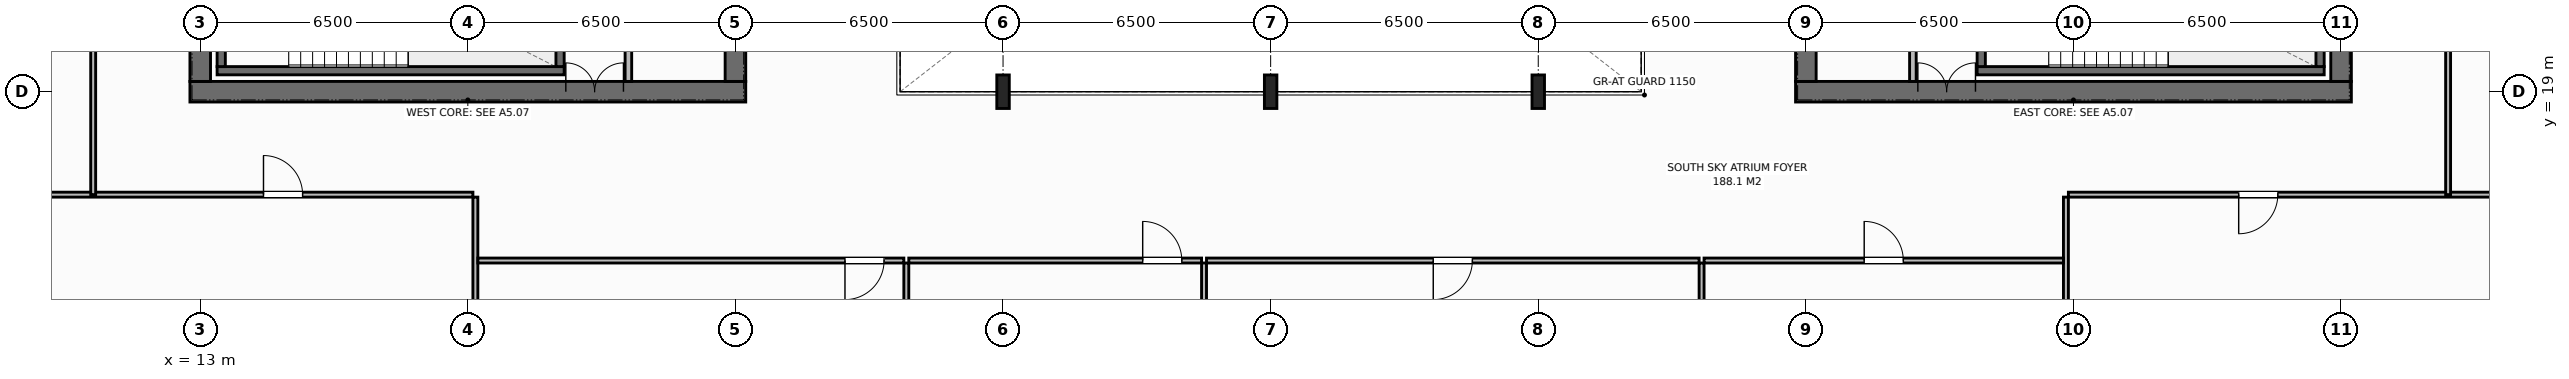
"""IFC4 building model, lengths in metres.
Left out: names, types, materials, properties, quantities, classifications, styles, units other than length and angle.
Written with IfcOpenShell. Run it as: python <this file> out.ifc"""

import sys

from ifc_helpers import new_model, si_unit, direction, frame, frame_2d, origin, origin_2d, place, context, subcontext, project, spatial, rectangle, i_section, extrude, element, fill, save


model = new_model("IFC4")
c1 = context("Model", 3, precision=1e-05, world=origin(), true_north=direction((0.0, 1.0)))
c2 = subcontext(c1, "Body", "Model", "MODEL_VIEW")
j1 = project(units=[si_unit("LENGTHUNIT", "METRE"), si_unit("PLANEANGLEUNIT", "RADIAN")], contexts=[c1])
p1 = place(None, origin())
s1 = spatial("IfcSite", under=j1, at=p1, CompositionType="ELEMENT")
p2 = place(p1, origin())
s2 = spatial("IfcBuilding", under=s1, at=p2, CompositionType="ELEMENT")
p3 = place(p2, frame((0.0, 0.0, 202.4)))
s3 = spatial("IfcBuildingStorey", under=s2, at=p3, CompositionType="ELEMENT", Elevation=202.4)
p4 = place(p3, frame((12.75, 19.0, 0.0), z_axis=(0.0, 0.0, 1.0), x_axis=(1.0, 0.0, 0.0)))
e1 = element("IfcWall", 1, at=p4, inside=s3, PredefinedType="SHEAR", context=c2, shape_type="SweptSolid", body=[
    extrude(rectangle(XDim=13.5, YDim=0.5, at=frame_2d((6.75, 0.0))), origin(), (0.0, 0.0, 1.0), 3.8),
])
p5 = place(p4, frame((9.13, 0.0, 0.0)))
e2 = element("IfcOpeningElement", 2, at=p5, cuts=e1, PredefinedType="OPENING", context=c2, shape_type="SweptSolid", body=[
    extrude(rectangle(XDim=1.4, YDim=2.2, at=frame_2d((0.7, 1.1))), frame((0.0, 0.26, 0.0), z_axis=(0.0, -1.0, 0.0), x_axis=(1.0, 0.0, 0.0)), (0.0, 0.0, 1.0), 0.52),
])
p6 = place(p3, frame((13.0, 19.25, 0.0), z_axis=(0.0, 0.0, 1.0), x_axis=(0.0, 1.0, 0.0)))
e3 = element("IfcWall", 3, at=p6, inside=s3, PredefinedType="SHEAR", context=c2, shape_type="SweptSolid", body=[
    extrude(rectangle(XDim=13.5, YDim=0.5, at=frame_2d((6.75, 0.0))), origin(), (0.0, 0.0, 1.0), 3.8),
])
p7 = place(p6, frame((4.8, 0.0, 0.0)))
e4 = element("IfcOpeningElement", 4, at=p7, cuts=e3, PredefinedType="OPENING", context=c2, shape_type="SweptSolid", body=[
    extrude(rectangle(XDim=1.4, YDim=2.2, at=frame_2d((0.7, 1.1))), frame((0.0, 0.26, 0.0), z_axis=(0.0, -1.0, 0.0), x_axis=(1.0, 0.0, 0.0)), (0.0, 0.0, 1.0), 0.52),
])
p8 = place(p3, frame((26.0, 19.25, 0.0), z_axis=(0.0, 0.0, 1.0), x_axis=(0.0, 1.0, 0.0)))
e5 = element("IfcWall", 5, at=p8, inside=s3, PredefinedType="SHEAR", context=c2, shape_type="SweptSolid", body=[
    extrude(rectangle(XDim=13.5, YDim=0.5, at=frame_2d((6.75, 0.0))), origin(), (0.0, 0.0, 1.0), 3.8),
])
p9 = place(p3, frame((51.75, 19.0, 0.0), z_axis=(0.0, 0.0, 1.0), x_axis=(1.0, 0.0, 0.0)))
e6 = element("IfcWall", 6, at=p9, inside=s3, PredefinedType="SHEAR", context=c2, shape_type="SweptSolid", body=[
    extrude(rectangle(XDim=13.5, YDim=0.5, at=frame_2d((6.75, 0.0))), origin(), (0.0, 0.0, 1.0), 3.8),
])
p10 = place(p9, frame((2.97, 0.0, 0.0)))
e7 = element("IfcOpeningElement", 7, at=p10, cuts=e6, PredefinedType="OPENING", context=c2, shape_type="SweptSolid", body=[
    extrude(rectangle(XDim=1.4, YDim=2.2, at=frame_2d((0.7, 1.1))), frame((0.0, 0.26, 0.0), z_axis=(0.0, -1.0, 0.0), x_axis=(1.0, 0.0, 0.0)), (0.0, 0.0, 1.0), 0.52),
])
p11 = place(p3, frame((52.0, 19.25, 0.0), z_axis=(0.0, 0.0, 1.0), x_axis=(0.0, 1.0, 0.0)))
e8 = element("IfcWall", 8, at=p11, inside=s3, PredefinedType="SHEAR", context=c2, shape_type="SweptSolid", body=[
    extrude(rectangle(XDim=13.5, YDim=0.5, at=frame_2d((6.75, 0.0))), origin(), (0.0, 0.0, 1.0), 3.8),
])
p12 = place(p3, frame((65.0, 19.25, 0.0), z_axis=(0.0, 0.0, 1.0), x_axis=(0.0, 1.0, 0.0)))
e9 = element("IfcWall", 9, at=p12, inside=s3, PredefinedType="SHEAR", context=c2, shape_type="SweptSolid", body=[
    extrude(rectangle(XDim=13.5, YDim=0.5, at=frame_2d((6.75, 0.0))), origin(), (0.0, 0.0, 1.0), 3.8),
])
p13 = place(p12, frame((8.2, 0.0, 0.0)))
e10 = element("IfcOpeningElement", 10, at=p13, cuts=e9, PredefinedType="OPENING", context=c2, shape_type="SweptSolid", body=[
    extrude(rectangle(XDim=1.3, YDim=2.2, at=frame_2d((0.65, 1.1))), frame((0.0, 0.26, 0.0), z_axis=(0.0, -1.0, 0.0), x_axis=(1.0, 0.0, 0.0)), (0.0, 0.0, 1.0), 0.52),
])
p14 = place(p3, frame((13.41, 19.51, 0.0), z_axis=(0.0, 0.0, 1.0), x_axis=(1.0, 0.0, 0.0)))
e11 = element("IfcWall", 11, at=p14, inside=s3, PredefinedType="SHEAR", context=c2, shape_type="SweptSolid", body=[
    extrude(rectangle(XDim=8.43, YDim=0.2, at=frame_2d((4.215, 0.0))), origin(), (0.0, 0.0, 1.0), 3.8),
])
for number, where, z_axis, x_axis in (
    (12, (13.51, 19.61, 0.0), (0.0, 0.0, 1.0), (0.0, 1.0, 0.0)),
    (13, (21.74, 19.61, 0.0), (0.0, 0.0, 1.0), (0.0, 1.0, 0.0)),
):
    element("IfcWall", number, at=place(p3, frame(where, z_axis=z_axis, x_axis=x_axis)), inside=s3, PredefinedType="SHEAR", context=c2, shape_type="SweptSolid", body=[
        extrude(rectangle(XDim=3.28, YDim=0.2, at=frame_2d((1.64, 0.0))), origin(), (0.0, 0.0, 1.0), 3.8),
    ])
p15 = place(p3, frame((56.16, 19.51, 0.0), z_axis=(0.0, 0.0, 1.0), x_axis=(1.0, 0.0, 0.0)))
e14 = element("IfcWall", 14, at=p15, inside=s3, PredefinedType="SHEAR", context=c2, shape_type="SweptSolid", body=[
    extrude(rectangle(XDim=8.43, YDim=0.2, at=frame_2d((4.215, 0.0))), origin(), (0.0, 0.0, 1.0), 3.8),
])
for number, where, z_axis, x_axis in (
    (15, (56.26, 19.61, 0.0), (0.0, 0.0, 1.0), (0.0, 1.0, 0.0)),
    (16, (64.49, 19.61, 0.0), (0.0, 0.0, 1.0), (0.0, 1.0, 0.0)),
):
    element("IfcWall", number, at=place(p3, frame(where, z_axis=z_axis, x_axis=x_axis)), inside=s3, PredefinedType="SHEAR", context=c2, shape_type="SweptSolid", body=[
        extrude(rectangle(XDim=3.28, YDim=0.2, at=frame_2d((1.64, 0.0))), origin(), (0.0, 0.0, 1.0), 3.8),
    ])
for number, where, z_axis, x_axis in (
    (17, (32.5, 19.0, 0.0), (0.0, 0.0, 1.0), (1.0, 0.0, 0.0)),
    (18, (39.0, 19.0, 0.0), (0.0, 0.0, 1.0), (1.0, 0.0, 0.0)),
    (19, (45.5, 19.0, 0.0), (0.0, 0.0, 1.0), (1.0, 0.0, 0.0)),
):
    element("IfcColumn", number, at=place(p3, frame(where, z_axis=z_axis, x_axis=x_axis)), inside=s3, PredefinedType="COLUMN", context=c2, shape_type="SweptSolid", body=[
        extrude(i_section(OverallWidth=0.303, OverallDepth=0.814, WebThickness=0.021, FlangeThickness=0.04, at=origin_2d()), origin(), (0.0, 0.0, 1.0), 3.8),
    ])
p16 = place(p3, frame((23.4, 19.25, 0.0), z_axis=(0.0, 0.0, 1.0), x_axis=(0.0, 1.0, 0.0)))
e20 = element("IfcWall", 20, at=p16, inside=s3, PredefinedType="STANDARD", context=c2, shape_type="SweptSolid", body=[
    extrude(rectangle(XDim=13.5, YDim=0.16, at=frame_2d((6.75, 0.0))), origin(), (0.0, 0.0, 1.0), 3.58),
])
p17 = place(p16, frame((2.25, 0.0, 0.0)))
e21 = element("IfcOpeningElement", 21, at=p17, cuts=e20, PredefinedType="OPENING", context=c2, shape_type="SweptSolid", body=[
    extrude(rectangle(XDim=0.95, YDim=2.15, at=frame_2d((0.475, 1.075))), frame((0.0, 0.09, 0.0), z_axis=(0.0, -1.0, 0.0), x_axis=(1.0, 0.0, 0.0)), (0.0, 0.0, 1.0), 0.18),
])
p18 = place(p16, frame((6.35, 0.0, 0.0)))
e22 = element("IfcOpeningElement", 22, at=p18, cuts=e20, PredefinedType="OPENING", context=c2, shape_type="SweptSolid", body=[
    extrude(rectangle(XDim=0.95, YDim=2.15, at=frame_2d((0.475, 1.075))), frame((0.0, 0.09, 0.0), z_axis=(0.0, -1.0, 0.0), x_axis=(1.0, 0.0, 0.0)), (0.0, 0.0, 1.0), 0.18),
])
p19 = place(p16, frame((9.35, 0.0, 0.0)))
e23 = element("IfcOpeningElement", 23, at=p19, cuts=e20, PredefinedType="OPENING", context=c2, shape_type="SweptSolid", body=[
    extrude(rectangle(XDim=1.1, YDim=2.2, at=frame_2d((0.55, 1.1))), frame((0.0, 0.09, 0.0), z_axis=(0.0, -1.0, 0.0), x_axis=(1.0, 0.0, 0.0)), (0.0, 0.0, 1.0), 0.18),
])
p20 = place(p16, frame((11.55, 0.0, 0.0)))
e24 = element("IfcOpeningElement", 24, at=p20, cuts=e20, PredefinedType="OPENING", context=c2, shape_type="SweptSolid", body=[
    extrude(rectangle(XDim=1.1, YDim=2.2, at=frame_2d((0.55, 1.1))), frame((0.0, 0.09, 0.0), z_axis=(0.0, -1.0, 0.0), x_axis=(1.0, 0.0, 0.0)), (0.0, 0.0, 1.0), 0.18),
])
p21 = place(p3, frame((54.6, 19.25, 0.0), z_axis=(0.0, 0.0, 1.0), x_axis=(0.0, 1.0, 0.0)))
e25 = element("IfcWall", 25, at=p21, inside=s3, PredefinedType="STANDARD", context=c2, shape_type="SweptSolid", body=[
    extrude(rectangle(XDim=13.5, YDim=0.16, at=frame_2d((6.75, 0.0))), origin(), (0.0, 0.0, 1.0), 3.58),
])
p22 = place(p21, frame((2.15, 0.0, 0.0)))
e26 = element("IfcOpeningElement", 26, at=p22, cuts=e25, PredefinedType="OPENING", context=c2, shape_type="SweptSolid", body=[
    extrude(rectangle(XDim=0.95, YDim=2.15, at=frame_2d((0.475, 1.075))), frame((0.0, 0.09, 0.0), z_axis=(0.0, -1.0, 0.0), x_axis=(1.0, 0.0, 0.0)), (0.0, 0.0, 1.0), 0.18),
])
p23 = place(p21, frame((6.25, 0.0, 0.0)))
e27 = element("IfcOpeningElement", 27, at=p23, cuts=e25, PredefinedType="OPENING", context=c2, shape_type="SweptSolid", body=[
    extrude(rectangle(XDim=0.95, YDim=2.15, at=frame_2d((0.475, 1.075))), frame((0.0, 0.09, 0.0), z_axis=(0.0, -1.0, 0.0), x_axis=(1.0, 0.0, 0.0)), (0.0, 0.0, 1.0), 0.18),
])
p24 = place(p21, frame((9.35, 0.0, 0.0)))
e28 = element("IfcOpeningElement", 28, at=p24, cuts=e25, PredefinedType="OPENING", context=c2, shape_type="SweptSolid", body=[
    extrude(rectangle(XDim=1.1, YDim=2.2, at=frame_2d((0.55, 1.1))), frame((0.0, 0.09, 0.0), z_axis=(0.0, -1.0, 0.0), x_axis=(1.0, 0.0, 0.0)), (0.0, 0.0, 1.0), 0.18),
])
p25 = place(p21, frame((11.55, 0.0, 0.0)))
e29 = element("IfcOpeningElement", 29, at=p25, cuts=e25, PredefinedType="OPENING", context=c2, shape_type="SweptSolid", body=[
    extrude(rectangle(XDim=1.1, YDim=2.2, at=frame_2d((0.55, 1.1))), frame((0.0, 0.09, 0.0), z_axis=(0.0, -1.0, 0.0), x_axis=(1.0, 0.0, 0.0)), (0.0, 0.0, 1.0), 0.18),
])
p26 = place(p3, frame((19.683, 5.02, 0.0), z_axis=(0.0, 0.0, 1.0), x_axis=(0.0, 1.0, 0.0)))
e30 = element("IfcWall", 30, at=p26, inside=s3, PredefinedType="PARTITIONING", context=c2, shape_type="SweptSolid", body=[
    extrude(rectangle(XDim=11.42, YDim=0.12, at=frame_2d((5.71, 0.0))), origin(), (0.0, 0.0, 1.0), 2.88),
])
p27 = place(p3, frame((5.98, 16.5, 0.0), z_axis=(0.0, 0.0, 1.0), x_axis=(1.0, 0.0, 0.0)))
e31 = element("IfcWall", 31, at=p27, inside=s3, PredefinedType="PARTITIONING", context=c2, shape_type="SweptSolid", body=[
    extrude(rectangle(XDim=13.643, YDim=0.12, at=frame_2d((6.822, 0.0))), origin(), (0.0, 0.0, 1.0), 3.58),
])
p28 = place(p27, frame((8.557, 0.0, 0.0)))
e32 = element("IfcOpeningElement", 32, at=p28, cuts=e31, PredefinedType="OPENING", context=c2, shape_type="SweptSolid", body=[
    extrude(rectangle(XDim=0.95, YDim=2.15, at=frame_2d((0.475, 1.075))), frame((0.0, 0.07, 0.0), z_axis=(0.0, -1.0, 0.0), x_axis=(1.0, 0.0, 0.0)), (0.0, 0.0, 1.0), 0.14),
])
p29 = place(p3, frame((30.151, 5.02, 0.0), z_axis=(0.0, 0.0, 1.0), x_axis=(0.0, 1.0, 0.0)))
e33 = element("IfcWall", 33, at=p29, inside=s3, PredefinedType="PARTITIONING", context=c2, shape_type="SweptSolid", body=[
    extrude(rectangle(XDim=9.82, YDim=0.12, at=frame_2d((4.91, 0.0))), origin(), (0.0, 0.0, 1.0), 3.58),
])
p30 = place(p3, frame((19.743, 14.9, 0.0), z_axis=(0.0, 0.0, 1.0), x_axis=(1.0, 0.0, 0.0)))
e34 = element("IfcWall", 34, at=p30, inside=s3, PredefinedType="PARTITIONING", context=c2, shape_type="SweptSolid", body=[
    extrude(rectangle(XDim=10.347, YDim=0.12, at=frame_2d((5.174, 0.0))), origin(), (0.0, 0.0, 1.0), 3.58),
])
p31 = place(p30, frame((8.917, 0.0, 0.0)))
e35 = element("IfcOpeningElement", 35, at=p31, cuts=e34, PredefinedType="OPENING", context=c2, shape_type="SweptSolid", body=[
    extrude(rectangle(XDim=0.95, YDim=2.15, at=frame_2d((0.475, 1.075))), frame((0.0, 0.07, 0.0), z_axis=(0.0, -1.0, 0.0), x_axis=(1.0, 0.0, 0.0)), (0.0, 0.0, 1.0), 0.14),
])
p32 = place(p3, frame((37.382, 5.02, 0.0), z_axis=(0.0, 0.0, 1.0), x_axis=(0.0, 1.0, 0.0)))
e36 = element("IfcWall", 36, at=p32, inside=s3, PredefinedType="PARTITIONING", context=c2, shape_type="SweptSolid", body=[
    extrude(rectangle(XDim=9.82, YDim=0.12, at=frame_2d((4.91, 0.0))), origin(), (0.0, 0.0, 1.0), 3.58),
])
p33 = place(p3, frame((30.211, 14.9, 0.0), z_axis=(0.0, 0.0, 1.0), x_axis=(1.0, 0.0, 0.0)))
e37 = element("IfcWall", 37, at=p33, inside=s3, PredefinedType="PARTITIONING", context=c2, shape_type="SweptSolid", body=[
    extrude(rectangle(XDim=7.111, YDim=0.12, at=frame_2d((3.556, 0.0))), origin(), (0.0, 0.0, 1.0), 3.58),
])
p34 = place(p33, frame((5.681, 0.0, 0.0)))
e38 = element("IfcOpeningElement", 38, at=p34, cuts=e37, PredefinedType="OPENING", context=c2, shape_type="SweptSolid", body=[
    extrude(rectangle(XDim=0.95, YDim=2.15, at=frame_2d((0.475, 1.075))), frame((0.0, 0.07, 0.0), z_axis=(0.0, -1.0, 0.0), x_axis=(1.0, 0.0, 0.0)), (0.0, 0.0, 1.0), 0.14),
])
p35 = place(p3, frame((49.467, 5.02, 0.0), z_axis=(0.0, 0.0, 1.0), x_axis=(0.0, 1.0, 0.0)))
e39 = element("IfcWall", 39, at=p35, inside=s3, PredefinedType="PARTITIONING", context=c2, shape_type="SweptSolid", body=[
    extrude(rectangle(XDim=9.82, YDim=0.12, at=frame_2d((4.91, 0.0))), origin(), (0.0, 0.0, 1.0), 3.58),
])
p36 = place(p3, frame((37.442, 14.9, 0.0), z_axis=(0.0, 0.0, 1.0), x_axis=(1.0, 0.0, 0.0)))
e40 = element("IfcWall", 40, at=p36, inside=s3, PredefinedType="PARTITIONING", context=c2, shape_type="SweptSolid", body=[
    extrude(rectangle(XDim=11.965, YDim=0.12, at=frame_2d((5.983, 0.0))), origin(), (0.0, 0.0, 1.0), 3.58),
])
p37 = place(p36, frame((5.508, 0.0, 0.0)))
e41 = element("IfcOpeningElement", 41, at=p37, cuts=e40, PredefinedType="OPENING", context=c2, shape_type="SweptSolid", body=[
    extrude(rectangle(XDim=0.95, YDim=2.15, at=frame_2d((0.475, 1.075))), frame((0.0, 0.07, 0.0), z_axis=(0.0, -1.0, 0.0), x_axis=(1.0, 0.0, 0.0)), (0.0, 0.0, 1.0), 0.14),
])
p38 = place(p3, frame((58.317, 5.02, 0.0), z_axis=(0.0, 0.0, 1.0), x_axis=(0.0, 1.0, 0.0)))
e42 = element("IfcWall", 42, at=p38, inside=s3, PredefinedType="PARTITIONING", context=c2, shape_type="SweptSolid", body=[
    extrude(rectangle(XDim=11.42, YDim=0.12, at=frame_2d((5.71, 0.0))), origin(), (0.0, 0.0, 1.0), 2.88),
])
p39 = place(p3, frame((49.527, 14.9, 0.0), z_axis=(0.0, 0.0, 1.0), x_axis=(1.0, 0.0, 0.0)))
e43 = element("IfcWall", 43, at=p39, inside=s3, PredefinedType="PARTITIONING", context=c2, shape_type="SweptSolid", body=[
    extrude(rectangle(XDim=8.729, YDim=0.12, at=frame_2d((4.365, 0.0))), origin(), (0.0, 0.0, 1.0), 3.58),
])
p40 = place(p39, frame((3.89, 0.0, 0.0)))
e44 = element("IfcOpeningElement", 44, at=p40, cuts=e43, PredefinedType="OPENING", context=c2, shape_type="SweptSolid", body=[
    extrude(rectangle(XDim=0.95, YDim=2.15, at=frame_2d((0.475, 1.075))), frame((0.0, 0.07, 0.0), z_axis=(0.0, -1.0, 0.0), x_axis=(1.0, 0.0, 0.0)), (0.0, 0.0, 1.0), 0.14),
])
p41 = place(p3, frame((58.377, 16.5, 0.0), z_axis=(0.0, 0.0, 1.0), x_axis=(1.0, 0.0, 0.0)))
e45 = element("IfcWall", 45, at=p41, inside=s3, PredefinedType="PARTITIONING", context=c2, shape_type="SweptSolid", body=[
    extrude(rectangle(XDim=13.643, YDim=0.12, at=frame_2d((6.822, 0.0))), origin(), (0.0, 0.0, 1.0), 3.58),
])
p42 = place(p41, frame((4.137, 0.0, 0.0)))
e46 = element("IfcOpeningElement", 46, at=p42, cuts=e45, PredefinedType="OPENING", context=c2, shape_type="SweptSolid", body=[
    extrude(rectangle(XDim=0.95, YDim=2.15, at=frame_2d((0.475, 1.075))), frame((0.0, 0.07, 0.0), z_axis=(0.0, -1.0, 0.0), x_axis=(1.0, 0.0, 0.0)), (0.0, 0.0, 1.0), 0.14),
])
p43 = place(p3, frame((10.4, 16.5, 0.0), z_axis=(0.0, 0.0, 1.0), x_axis=(0.0, 1.0, 0.0)))
e47 = element("IfcWall", 47, at=p43, inside=s3, PredefinedType="PARTITIONING", context=c2, shape_type="SweptSolid", body=[
    extrude(rectangle(XDim=19.0, YDim=0.12, at=frame_2d((9.5, 0.0))), origin(), (0.0, 0.0, 1.0), 3.58),
])
p44 = place(p43, frame((9.025, 0.0, 0.0)))
e48 = element("IfcOpeningElement", 48, at=p44, cuts=e47, PredefinedType="OPENING", context=c2, shape_type="SweptSolid", body=[
    extrude(rectangle(XDim=0.95, YDim=2.15, at=frame_2d((0.475, 1.075))), frame((0.0, 0.07, 0.0), z_axis=(0.0, -1.0, 0.0), x_axis=(1.0, 0.0, 0.0)), (0.0, 0.0, 1.0), 0.14),
])
p45 = place(p3, frame((67.6, 16.5, 0.0), z_axis=(0.0, 0.0, 1.0), x_axis=(0.0, 1.0, 0.0)))
e49 = element("IfcWall", 49, at=p45, inside=s3, PredefinedType="PARTITIONING", context=c2, shape_type="SweptSolid", body=[
    extrude(rectangle(XDim=9.5, YDim=0.12, at=frame_2d((4.75, 0.0))), origin(), (0.0, 0.0, 1.0), 3.58),
])
p46 = place(p45, frame((5.325, 0.0, 0.0)))
e50 = element("IfcOpeningElement", 50, at=p46, cuts=e49, PredefinedType="OPENING", context=c2, shape_type="SweptSolid", body=[
    extrude(rectangle(XDim=0.95, YDim=2.15, at=frame_2d((0.475, 1.075))), frame((0.0, 0.07, 0.0), z_axis=(0.0, -1.0, 0.0), x_axis=(1.0, 0.0, 0.0)), (0.0, 0.0, 1.0), 0.14),
])
p47 = place(p5, origin())
e51 = element("IfcDoor", 51, at=p47, inside=s3, OperationType="DOUBLE_DOOR_SINGLE_SWING", PredefinedType="DOOR", context=c2, shape_type="SweptSolid", body=[
    extrude(rectangle(XDim=1.4, YDim=2.2, at=frame_2d((0.7, 1.1))), frame((0.0, 0.075, 0.0), z_axis=(0.0, -1.0, 0.0), x_axis=(1.0, 0.0, 0.0)), (0.0, 0.0, 1.0), 0.05),
])
fill(e2, e51)
p48 = place(p10, origin())
e52 = element("IfcDoor", 52, at=p48, inside=s3, OperationType="DOUBLE_DOOR_SINGLE_SWING", PredefinedType="DOOR", context=c2, shape_type="SweptSolid", body=[
    extrude(rectangle(XDim=1.4, YDim=2.2, at=frame_2d((0.7, 1.1))), frame((0.0, 0.075, 0.0), z_axis=(0.0, -1.0, 0.0), x_axis=(1.0, 0.0, 0.0)), (0.0, 0.0, 1.0), 0.05),
])
fill(e7, e52)
p49 = place(p28, origin())
e53 = element("IfcDoor", 53, at=p49, inside=s3, OperationType="SINGLE_SWING_LEFT", PredefinedType="DOOR", context=c2, shape_type="SweptSolid", body=[
    extrude(rectangle(XDim=0.95, YDim=2.15, at=frame_2d((0.475, 1.075))), frame((0.0, 0.025, 0.0), z_axis=(0.0, -1.0, 0.0), x_axis=(1.0, 0.0, 0.0)), (0.0, 0.0, 1.0), 0.05),
])
fill(e32, e53)
p50 = place(p31, origin())
e54 = element("IfcDoor", 54, at=p50, inside=s3, OperationType="SINGLE_SWING_RIGHT", PredefinedType="DOOR", context=c2, shape_type="SweptSolid", body=[
    extrude(rectangle(XDim=0.95, YDim=2.15, at=frame_2d((0.475, 1.075))), frame((0.0, 0.025, 0.0), z_axis=(0.0, -1.0, 0.0), x_axis=(1.0, 0.0, 0.0)), (0.0, 0.0, 1.0), 0.05),
])
fill(e35, e54)
p51 = place(p34, origin())
e55 = element("IfcDoor", 55, at=p51, inside=s3, OperationType="SINGLE_SWING_LEFT", PredefinedType="DOOR", context=c2, shape_type="SweptSolid", body=[
    extrude(rectangle(XDim=0.95, YDim=2.15, at=frame_2d((0.475, 1.075))), frame((0.0, 0.025, 0.0), z_axis=(0.0, -1.0, 0.0), x_axis=(1.0, 0.0, 0.0)), (0.0, 0.0, 1.0), 0.05),
])
fill(e38, e55)
p52 = place(p37, origin())
e56 = element("IfcDoor", 56, at=p52, inside=s3, OperationType="SINGLE_SWING_RIGHT", PredefinedType="DOOR", context=c2, shape_type="SweptSolid", body=[
    extrude(rectangle(XDim=0.95, YDim=2.15, at=frame_2d((0.475, 1.075))), frame((0.0, 0.025, 0.0), z_axis=(0.0, -1.0, 0.0), x_axis=(1.0, 0.0, 0.0)), (0.0, 0.0, 1.0), 0.05),
])
fill(e41, e56)
p53 = place(p40, origin())
e57 = element("IfcDoor", 57, at=p53, inside=s3, OperationType="SINGLE_SWING_LEFT", PredefinedType="DOOR", context=c2, shape_type="SweptSolid", body=[
    extrude(rectangle(XDim=0.95, YDim=2.15, at=frame_2d((0.475, 1.075))), frame((0.0, 0.025, 0.0), z_axis=(0.0, -1.0, 0.0), x_axis=(1.0, 0.0, 0.0)), (0.0, 0.0, 1.0), 0.05),
])
fill(e44, e57)
p54 = place(p42, origin())
e58 = element("IfcDoor", 58, at=p54, inside=s3, OperationType="SINGLE_SWING_RIGHT", PredefinedType="DOOR", context=c2, shape_type="SweptSolid", body=[
    extrude(rectangle(XDim=0.95, YDim=2.15, at=frame_2d((0.475, 1.075))), frame((0.0, 0.025, 0.0), z_axis=(0.0, -1.0, 0.0), x_axis=(1.0, 0.0, 0.0)), (0.0, 0.0, 1.0), 0.05),
])
fill(e46, e58)
save(model, sys.argv[1])
